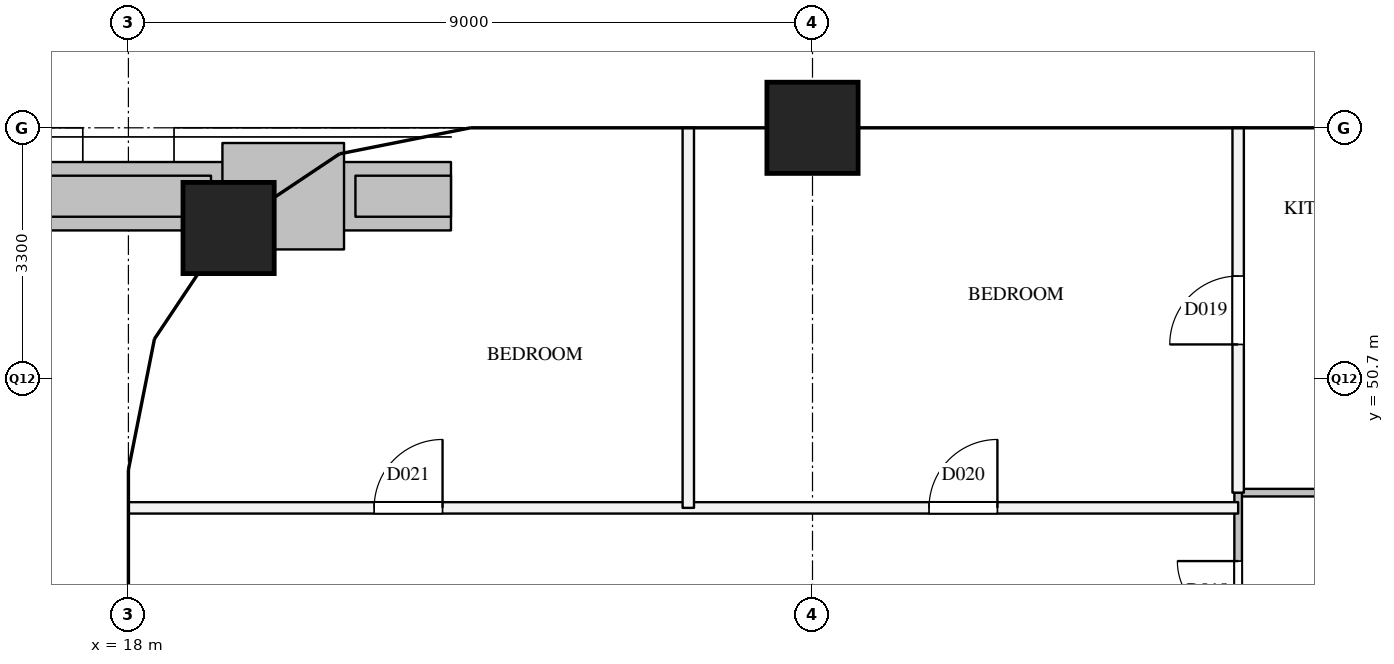
"""IFC4 building model, lengths in metres.
Left out: names, types, materials, properties, quantities, classifications, styles, units other than length and angle.
Written with IfcOpenShell. Run it as: python <this file> out.ifc"""

import sys

from ifc_helpers import new_model, si_unit, direction, frame, frame_2d, origin, origin_2d, place, context, subcontext, project, spatial, rectangle, extrude, element, fill, save


model = new_model("IFC4")
c1 = context("Model", 3, precision=1e-05, world=origin(), true_north=direction((0.0, 1.0)))
c2 = subcontext(c1, "Body", "Model", "MODEL_VIEW")
j1 = project(units=[si_unit("LENGTHUNIT", "METRE"), si_unit("PLANEANGLEUNIT", "RADIAN")], contexts=[c1])
p1 = place(None, origin())
s1 = spatial("IfcSite", under=j1, at=p1, CompositionType="ELEMENT")
p2 = place(p1, origin())
s2 = spatial("IfcBuilding", under=s1, at=p2, CompositionType="ELEMENT")
p3 = place(p2, frame((0.0, 0.0, 234.5)))
s3 = spatial("IfcBuildingStorey", under=s2, at=p3, CompositionType="ELEMENT", Elevation=234.5)
for number, where, z_axis, x_axis in (
    (1, (19.318, 52.682, 0.0), (0.0, 0.0, 1.0), (1.0, 0.0, 0.0)),
    (2, (27.0, 54.0, 0.0), (0.0, 0.0, 1.0), (1.0, 0.0, 0.0)),
):
    element("IfcColumn", number, at=place(p3, frame(where, z_axis=z_axis, x_axis=x_axis)), inside=s3, PredefinedType="COLUMN", context=c2, shape_type="SweptSolid", body=[
        extrude(rectangle(XDim=1.2, YDim=1.2, at=origin_2d()), origin(), (0.0, 0.0, 1.0), 3.9),
    ])
p4 = place(p3, frame((4.588, 53.1, 0.0), z_axis=(0.0, 0.0, 1.0), x_axis=(0.999999999904, 1.3827816e-05, 0.0)))
e3 = element("IfcWall", 3, at=p4, inside=s3, PredefinedType="SOLIDWALL", context=c2, shape_type="SweptSolid", body=[
    extrude(rectangle(XDim=17.656, YDim=0.9, at=frame_2d((8.828, 0.0))), origin(), (0.0, 0.0, 1.0), 0.6),
])
p5 = place(p3, frame((16.573, 53.1, 0.6), z_axis=(0.0, 0.0, 1.0), x_axis=(0.999999995284, 9.7115664e-05, 0.0)))
e4 = element("IfcWall", 4, at=p5, inside=s3, PredefinedType="SOLIDWALL", context=c2, shape_type="SweptSolid", body=[
    extrude(rectangle(XDim=2.514, YDim=0.54, at=frame_2d((1.257, 0.0))), origin(), (0.0, 0.0, 1.0), 0.75),
])
p6 = place(p3, frame((20.987, 53.1, 0.6), z_axis=(0.0, 0.0, 1.0), x_axis=(1.0, 0.0, 0.0)))
e5 = element("IfcWall", 5, at=p6, inside=s3, PredefinedType="SOLIDWALL", context=c2, shape_type="SweptSolid", body=[
    extrude(rectangle(XDim=1.257, YDim=0.54, at=frame_2d((0.628, 0.0))), origin(), (0.0, 0.0, 1.0), 0.75),
])
p7 = place(p3, frame((19.237, 53.1, 0.6), z_axis=(0.0, 0.0, 1.0), x_axis=(1.0, 0.0, 0.0)))
e6 = element("IfcWall", 6, at=p7, inside=s3, PredefinedType="SOLIDWALL", context=c2, shape_type="SweptSolid", body=[
    extrude(rectangle(XDim=1.6, YDim=1.4, at=frame_2d((0.8, 0.0))), origin(), (0.0, 0.0, 1.0), 2.6),
])
p8 = place(p3, frame((18.0, 49.0, 0.0), z_axis=(0.0, 0.0, 1.0), x_axis=(1.0, 0.0, 0.0)))
e7 = element("IfcWall", 7, at=p8, inside=s3, PredefinedType="PARTITIONING", context=c2, shape_type="SweptSolid", body=[
    extrude(rectangle(XDim=14.6, YDim=0.15, at=frame_2d((7.3, 0.0))), origin(), (0.0, 0.0, 1.0), 2.6),
])
p9 = place(p8, frame((10.533, 0.0, 0.0)))
e8 = element("IfcOpeningElement", 8, at=p9, cuts=e7, PredefinedType="OPENING", context=c2, shape_type="SweptSolid", body=[
    extrude(rectangle(XDim=0.9, YDim=2.1, at=frame_2d((0.45, 1.05))), frame((0.0, 0.085, 0.0), z_axis=(0.0, -1.0, 0.0), x_axis=(1.0, 0.0, 0.0)), (0.0, 0.0, 1.0), 0.17),
])
p10 = place(p8, frame((3.233, 0.0, 0.0)))
e9 = element("IfcOpeningElement", 9, at=p10, cuts=e7, PredefinedType="OPENING", context=c2, shape_type="SweptSolid", body=[
    extrude(rectangle(XDim=0.9, YDim=2.1, at=frame_2d((0.45, 1.05))), frame((0.0, 0.085, 0.0), z_axis=(0.0, -1.0, 0.0), x_axis=(1.0, 0.0, 0.0)), (0.0, 0.0, 1.0), 0.17),
])
p11 = place(p3, frame((25.366, 49.0, 0.0), z_axis=(0.0, 0.0, 1.0), x_axis=(0.0, 1.0, 0.0)))
e10 = element("IfcWall", 10, at=p11, inside=s3, PredefinedType="PARTITIONING", context=c2, shape_type="SweptSolid", body=[
    extrude(rectangle(XDim=5.0, YDim=0.15, at=frame_2d((2.5, 0.0))), origin(), (0.0, 0.0, 1.0), 2.6),
])
p12 = place(p3, frame((32.6, 49.2, 0.0), z_axis=(0.0, 0.0, 1.0), x_axis=(0.0, 1.0, 0.0)))
e11 = element("IfcWall", 11, at=p12, inside=s3, PredefinedType="PARTITIONING", context=c2, shape_type="SweptSolid", body=[
    extrude(rectangle(XDim=4.8, YDim=0.15, at=frame_2d((2.4, 0.0))), origin(), (0.0, 0.0, 1.0), 2.6),
])
p13 = place(p12, frame((1.95, 0.0, 0.0)))
e12 = element("IfcOpeningElement", 12, at=p13, cuts=e11, PredefinedType="OPENING", context=c2, shape_type="SweptSolid", body=[
    extrude(rectangle(XDim=0.9, YDim=2.1, at=frame_2d((0.45, 1.05))), frame((0.0, 0.085, 0.0), z_axis=(0.0, -1.0, 0.0), x_axis=(1.0, 0.0, 0.0)), (0.0, 0.0, 1.0), 0.17),
])
p14 = place(p3, frame((32.6, 49.2, 0.0), z_axis=(0.0, 0.0, 1.0), x_axis=(1.0, 0.0, 0.0)))
e13 = element("IfcWall", 13, at=p14, inside=s3, PredefinedType="PARTITIONING", context=c2, shape_type="SweptSolid", body=[
    extrude(rectangle(XDim=1.9, YDim=0.1, at=frame_2d((0.95, 0.0))), origin(), (0.0, 0.0, 1.0), 3.6),
])
p15 = place(p3, frame((32.6, 46.8, 0.0), z_axis=(0.0, 0.0, 1.0), x_axis=(0.0, 1.0, 0.0)))
e14 = element("IfcWall", 14, at=p15, inside=s3, PredefinedType="PARTITIONING", context=c2, shape_type="SweptSolid", body=[
    extrude(rectangle(XDim=2.4, YDim=0.1, at=frame_2d((1.2, 0.0))), origin(), (0.0, 0.0, 1.0), 3.6),
])
p16 = place(p15, frame((0.7, 0.0, 0.0)))
e15 = element("IfcOpeningElement", 15, at=p16, cuts=e14, PredefinedType="OPENING", context=c2, shape_type="SweptSolid", body=[
    extrude(rectangle(XDim=0.8, YDim=2.1, at=frame_2d((0.4, 1.05))), frame((0.0, 0.06, 0.0), z_axis=(0.0, -1.0, 0.0), x_axis=(1.0, 0.0, 0.0)), (0.0, 0.0, 1.0), 0.12),
])
p17 = place(p16, origin())
e16 = element("IfcDoor", 16, at=p17, inside=s3, OperationType="SINGLE_SWING_RIGHT", PredefinedType="DOOR", context=c2, shape_type="SweptSolid", body=[
    extrude(rectangle(XDim=0.8, YDim=2.1, at=frame_2d((0.4, 1.05))), frame((0.0, 0.025, 0.0), z_axis=(0.0, -1.0, 0.0), x_axis=(1.0, 0.0, 0.0)), (0.0, 0.0, 1.0), 0.05),
])
fill(e15, e16)
p18 = place(p13, origin())
e17 = element("IfcDoor", 17, at=p18, inside=s3, OperationType="SINGLE_SWING_LEFT", PredefinedType="DOOR", context=c2, shape_type="SweptSolid", body=[
    extrude(rectangle(XDim=0.9, YDim=2.1, at=frame_2d((0.45, 1.05))), frame((0.0, 0.025, 0.0), z_axis=(0.0, -1.0, 0.0), x_axis=(1.0, 0.0, 0.0)), (0.0, 0.0, 1.0), 0.05),
])
fill(e12, e17)
p19 = place(p9, origin())
e18 = element("IfcDoor", 18, at=p19, inside=s3, OperationType="SINGLE_SWING_RIGHT", PredefinedType="DOOR", context=c2, shape_type="SweptSolid", body=[
    extrude(rectangle(XDim=0.9, YDim=2.1, at=frame_2d((0.45, 1.05))), frame((0.0, 0.025, 0.0), z_axis=(0.0, -1.0, 0.0), x_axis=(1.0, 0.0, 0.0)), (0.0, 0.0, 1.0), 0.05),
])
fill(e8, e18)
p20 = place(p10, origin())
e19 = element("IfcDoor", 19, at=p20, inside=s3, OperationType="SINGLE_SWING_RIGHT", PredefinedType="DOOR", context=c2, shape_type="SweptSolid", body=[
    extrude(rectangle(XDim=0.9, YDim=2.1, at=frame_2d((0.45, 1.05))), frame((0.0, 0.025, 0.0), z_axis=(0.0, -1.0, 0.0), x_axis=(1.0, 0.0, 0.0)), (0.0, 0.0, 1.0), 0.05),
])
fill(e9, e19)
save(model, sys.argv[1])
